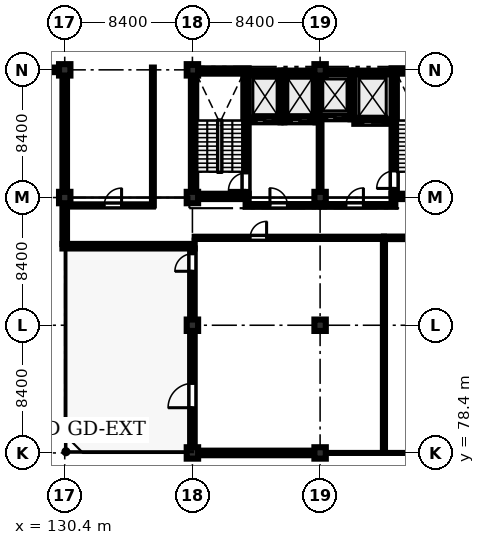
"""IFC4 building model, lengths in metres.
Left out: names, types, materials, properties, quantities, classifications, styles, units other than length and angle.
Written with IfcOpenShell. Run it as: python <this file> out.ifc"""

import sys

from ifc_helpers import new_model, si_unit, direction, frame, frame_2d, origin, origin_2d, place, context, subcontext, project, spatial, rectangle, extrude, element, fill, save


model = new_model("IFC4")
c1 = context("Model", 3, precision=1e-05, world=origin(), true_north=direction((0.0, 1.0)))
c2 = subcontext(c1, "Body", "Model", "MODEL_VIEW")
j1 = project(units=[si_unit("LENGTHUNIT", "METRE"), si_unit("PLANEANGLEUNIT", "RADIAN")], contexts=[c1])
p1 = place(None, origin())
s1 = spatial("IfcSite", under=j1, at=p1, CompositionType="ELEMENT")
p2 = place(p1, origin())
s2 = spatial("IfcBuilding", under=s1, at=p2, CompositionType="ELEMENT")
p3 = place(p2, frame((0.0, 0.0, 44.4)))
s3 = spatial("IfcBuildingStorey", under=s2, at=p3, CompositionType="ELEMENT", Elevation=44.4)
for number, where, z_axis, x_axis in (
    (1, (130.4, 95.2, 0.0), (0.0, 0.0, 1.0), (1.0, 0.0, 0.0)),
    (2, (130.4, 103.6, 0.0), (0.0, 0.0, 1.0), (1.0, 0.0, 0.0)),
    (3, (138.8, 78.4, 0.0), (0.0, 0.0, 1.0), (1.0, 0.0, 0.0)),
    (4, (138.8, 86.8, 0.0), (0.0, 0.0, 1.0), (1.0, 0.0, 0.0)),
    (5, (138.8, 95.2, 0.0), (0.0, 0.0, 1.0), (1.0, 0.0, 0.0)),
    (6, (138.8, 103.6, 0.0), (0.0, 0.0, 1.0), (1.0, 0.0, 0.0)),
    (7, (147.2, 78.4, 0.0), (0.0, 0.0, 1.0), (1.0, 0.0, 0.0)),
    (8, (147.2, 86.8, 0.0), (0.0, 0.0, 1.0), (1.0, 0.0, 0.0)),
    (9, (147.2, 95.2, 0.0), (0.0, 0.0, 1.0), (1.0, 0.0, 0.0)),
    (10, (147.2, 103.6, 0.0), (0.0, 0.0, 1.0), (1.0, 0.0, 0.0)),
):
    element("IfcColumn", number, at=place(p3, frame(where, z_axis=z_axis, x_axis=x_axis)), inside=s3, PredefinedType="COLUMN", context=c2, shape_type="SweptSolid", body=[
        extrude(rectangle(XDim=0.75, YDim=0.75, at=origin_2d()), origin(), (0.0, 0.0, 1.0), 4.01),
    ])
for number, where, z_axis, x_axis in (
    (11, (138.7, 95.275, 0.0), (0.0, 0.0, 1.0), (1.0, 0.0, 0.0)),
    (12, (138.7, 103.525, 0.0), (0.0, 0.0, 1.0), (1.0, 0.0, 0.0)),
):
    element("IfcWall", number, at=place(p3, frame(where, z_axis=z_axis, x_axis=x_axis)), inside=s3, PredefinedType="SHEAR", context=c2, shape_type="SweptSolid", body=[
        extrude(rectangle(XDim=3.8, YDim=0.35, at=frame_2d((1.9, 0.0))), origin(), (0.0, 0.0, 1.0), 4.01),
    ])
p4 = place(p3, frame((138.875, 95.45, 0.0), z_axis=(0.0, 0.0, 1.0), x_axis=(0.0, 1.0, 0.0)))
e13 = element("IfcWall", 13, at=p4, inside=s3, PredefinedType="SHEAR", context=c2, shape_type="SweptSolid", body=[
    extrude(rectangle(XDim=7.9, YDim=0.35, at=frame_2d((3.95, 0.0))), origin(), (0.0, 0.0, 1.0), 4.01),
])
p5 = place(p3, frame((142.325, 95.45, 0.0), z_axis=(0.0, 0.0, 1.0), x_axis=(0.0, 1.0, 0.0)))
e14 = element("IfcWall", 14, at=p5, inside=s3, PredefinedType="SHEAR", context=c2, shape_type="SweptSolid", body=[
    extrude(rectangle(XDim=7.9, YDim=0.35, at=frame_2d((3.95, 0.0))), origin(), (0.0, 0.0, 1.0), 4.01),
])
p6 = place(p5, frame((0.22, 0.0, 0.0)))
e15 = element("IfcOpeningElement", 15, at=p6, cuts=e14, PredefinedType="OPENING", context=c2, shape_type="SweptSolid", body=[
    extrude(rectangle(XDim=1.15, YDim=2.15, at=frame_2d((0.575, 1.075))), frame((0.0, 0.185, 0.0), z_axis=(0.0, -1.0, 0.0), x_axis=(1.0, 0.0, 0.0)), (0.0, 0.0, 1.0), 0.37),
])
for number, where, z_axis, x_axis in (
    (16, (151.9, 95.275, 0.0), (0.0, 0.0, 1.0), (1.0, 0.0, 0.0)),
    (17, (151.9, 103.525, 0.0), (0.0, 0.0, 1.0), (1.0, 0.0, 0.0)),
):
    element("IfcWall", number, at=place(p3, frame(where, z_axis=z_axis, x_axis=x_axis)), inside=s3, PredefinedType="SHEAR", context=c2, shape_type="SweptSolid", body=[
        extrude(rectangle(XDim=3.8, YDim=0.35, at=frame_2d((1.9, 0.0))), origin(), (0.0, 0.0, 1.0), 4.01),
    ])
p7 = place(p3, frame((152.075, 95.45, 0.0), z_axis=(0.0, 0.0, 1.0), x_axis=(0.0, 1.0, 0.0)))
e18 = element("IfcWall", 18, at=p7, inside=s3, PredefinedType="SHEAR", context=c2, shape_type="SweptSolid", body=[
    extrude(rectangle(XDim=7.9, YDim=0.35, at=frame_2d((3.95, 0.0))), origin(), (0.0, 0.0, 1.0), 4.01),
])
p8 = place(p7, frame((0.35, 0.0, 0.0)))
e19 = element("IfcOpeningElement", 19, at=p8, cuts=e18, PredefinedType="OPENING", context=c2, shape_type="SweptSolid", body=[
    extrude(rectangle(XDim=1.15, YDim=2.15, at=frame_2d((0.575, 1.075))), frame((0.0, 0.185, 0.0), z_axis=(0.0, -1.0, 0.0), x_axis=(1.0, 0.0, 0.0)), (0.0, 0.0, 1.0), 0.37),
])
p9 = place(p3, frame((142.5, 100.275, 0.0), z_axis=(0.0, 0.0, 1.0), x_axis=(1.0, 0.0, 0.0)))
e20 = element("IfcWall", 20, at=p9, inside=s3, PredefinedType="SHEAR", context=c2, shape_type="SweptSolid", body=[
    extrude(rectangle(XDim=2.1, YDim=0.25, at=frame_2d((1.05, 0.0))), origin(), (0.0, 0.0, 1.0), 4.01),
])
p10 = place(p9, frame((0.5, 0.0, 0.0)))
e21 = element("IfcOpeningElement", 21, at=p10, cuts=e20, PredefinedType="OPENING", context=c2, shape_type="SweptSolid", body=[
    extrude(rectangle(XDim=1.1, YDim=2.15, at=frame_2d((0.55, 1.075))), frame((0.0, 0.135, 0.0), z_axis=(0.0, -1.0, 0.0), x_axis=(1.0, 0.0, 0.0)), (0.0, 0.0, 1.0), 0.27),
])
p11 = place(p3, frame((142.5, 103.425, 0.0), z_axis=(0.0, 0.0, 1.0), x_axis=(1.0, 0.0, 0.0)))
e22 = element("IfcWall", 22, at=p11, inside=s3, PredefinedType="SHEAR", context=c2, shape_type="SweptSolid", body=[
    extrude(rectangle(XDim=2.1, YDim=0.25, at=frame_2d((1.05, 0.0))), origin(), (0.0, 0.0, 1.0), 4.01),
])
p12 = place(p3, frame((144.725, 100.15, 0.0), z_axis=(0.0, 0.0, 1.0), x_axis=(0.0, 1.0, 0.0)))
e23 = element("IfcWall", 23, at=p12, inside=s3, PredefinedType="SHEAR", context=c2, shape_type="SweptSolid", body=[
    extrude(rectangle(XDim=3.4, YDim=0.25, at=frame_2d((1.7, 0.0))), origin(), (0.0, 0.0, 1.0), 4.01),
])
p13 = place(p3, frame((144.85, 100.275, 0.0), z_axis=(0.0, 0.0, 1.0), x_axis=(1.0, 0.0, 0.0)))
e24 = element("IfcWall", 24, at=p13, inside=s3, PredefinedType="SHEAR", context=c2, shape_type="SweptSolid", body=[
    extrude(rectangle(XDim=2.05, YDim=0.25, at=frame_2d((1.025, 0.0))), origin(), (0.0, 0.0, 1.0), 4.01),
])
p14 = place(p13, frame((0.465, 0.0, 0.0)))
e25 = element("IfcOpeningElement", 25, at=p14, cuts=e24, PredefinedType="OPENING", context=c2, shape_type="SweptSolid", body=[
    extrude(rectangle(XDim=1.12, YDim=2.15, at=frame_2d((0.56, 1.075))), frame((0.0, 0.135, 0.0), z_axis=(0.0, -1.0, 0.0), x_axis=(1.0, 0.0, 0.0)), (0.0, 0.0, 1.0), 0.27),
])
p15 = place(p3, frame((144.85, 103.425, 0.0), z_axis=(0.0, 0.0, 1.0), x_axis=(1.0, 0.0, 0.0)))
e26 = element("IfcWall", 26, at=p15, inside=s3, PredefinedType="SHEAR", context=c2, shape_type="SweptSolid", body=[
    extrude(rectangle(XDim=2.05, YDim=0.25, at=frame_2d((1.025, 0.0))), origin(), (0.0, 0.0, 1.0), 4.01),
])
p16 = place(p3, frame((147.025, 100.15, 0.0), z_axis=(0.0, 0.0, 1.0), x_axis=(0.0, 1.0, 0.0)))
e27 = element("IfcWall", 27, at=p16, inside=s3, PredefinedType="SHEAR", context=c2, shape_type="SweptSolid", body=[
    extrude(rectangle(XDim=3.4, YDim=0.25, at=frame_2d((1.7, 0.0))), origin(), (0.0, 0.0, 1.0), 4.01),
])
p17 = place(p3, frame((147.15, 100.475, 0.0), z_axis=(0.0, 0.0, 1.0), x_axis=(1.0, 0.0, 0.0)))
e28 = element("IfcWall", 28, at=p17, inside=s3, PredefinedType="SHEAR", context=c2, shape_type="SweptSolid", body=[
    extrude(rectangle(XDim=2.05, YDim=0.25, at=frame_2d((1.025, 0.0))), origin(), (0.0, 0.0, 1.0), 4.01),
])
p18 = place(p17, frame((0.495, 0.0, 0.0)))
e29 = element("IfcOpeningElement", 29, at=p18, cuts=e28, PredefinedType="OPENING", context=c2, shape_type="SweptSolid", body=[
    extrude(rectangle(XDim=1.06, YDim=2.15, at=frame_2d((0.53, 1.075))), frame((0.0, 0.135, 0.0), z_axis=(0.0, -1.0, 0.0), x_axis=(1.0, 0.0, 0.0)), (0.0, 0.0, 1.0), 0.27),
])
p19 = place(p3, frame((147.15, 103.425, 0.0), z_axis=(0.0, 0.0, 1.0), x_axis=(1.0, 0.0, 0.0)))
e30 = element("IfcWall", 30, at=p19, inside=s3, PredefinedType="SHEAR", context=c2, shape_type="SweptSolid", body=[
    extrude(rectangle(XDim=2.05, YDim=0.25, at=frame_2d((1.025, 0.0))), origin(), (0.0, 0.0, 1.0), 4.01),
])
p20 = place(p3, frame((149.325, 100.35, 0.0), z_axis=(0.0, 0.0, 1.0), x_axis=(0.0, 1.0, 0.0)))
e31 = element("IfcWall", 31, at=p20, inside=s3, PredefinedType="SHEAR", context=c2, shape_type="SweptSolid", body=[
    extrude(rectangle(XDim=3.2, YDim=0.25, at=frame_2d((1.6, 0.0))), origin(), (0.0, 0.0, 1.0), 4.01),
])
p21 = place(p3, frame((149.45, 100.175, 0.0), z_axis=(0.0, 0.0, 1.0), x_axis=(1.0, 0.0, 0.0)))
e32 = element("IfcWall", 32, at=p21, inside=s3, PredefinedType="SHEAR", context=c2, shape_type="SweptSolid", body=[
    extrude(rectangle(XDim=2.45, YDim=0.25, at=frame_2d((1.225, 0.0))), origin(), (0.0, 0.0, 1.0), 4.01),
])
p22 = place(p21, frame((0.575, 0.0, 0.0)))
e33 = element("IfcOpeningElement", 33, at=p22, cuts=e32, PredefinedType="OPENING", context=c2, shape_type="SweptSolid", body=[
    extrude(rectangle(XDim=1.3, YDim=2.25, at=frame_2d((0.65, 1.125))), frame((0.0, 0.135, 0.0), z_axis=(0.0, -1.0, 0.0), x_axis=(1.0, 0.0, 0.0)), (0.0, 0.0, 1.0), 0.27),
])
p23 = place(p3, frame((149.45, 103.425, 0.0), z_axis=(0.0, 0.0, 1.0), x_axis=(1.0, 0.0, 0.0)))
e34 = element("IfcWall", 34, at=p23, inside=s3, PredefinedType="SHEAR", context=c2, shape_type="SweptSolid", body=[
    extrude(rectangle(XDim=2.45, YDim=0.25, at=frame_2d((1.225, 0.0))), origin(), (0.0, 0.0, 1.0), 4.01),
])
p24 = place(p3, frame((146.825, 78.4, 0.0), z_axis=(0.0, 0.0, 1.0), x_axis=(-1.0, 0.0, 0.0)))
e35 = element("IfcWall", 35, at=p24, inside=s3, PredefinedType="STANDARD", context=c2, shape_type="SweptSolid", body=[
    extrude(rectangle(XDim=7.65, YDim=0.3, at=frame_2d((3.825, 0.0))), origin(), (0.0, 0.0, 1.0), 3.31),
])
p25 = place(p24, frame((1.15, 0.0, 0.95)))
e36 = element("IfcOpeningElement", 36, at=p25, cuts=e35, PredefinedType="OPENING", context=c2, shape_type="SweptSolid", body=[
    extrude(rectangle(XDim=2.35, YDim=1.95, at=frame_2d((1.175, 0.975))), frame((0.0, 0.16, 0.0), z_axis=(0.0, -1.0, 0.0), x_axis=(1.0, 0.0, 0.0)), (0.0, 0.0, 1.0), 0.32),
])
p26 = place(p3, frame((130.4, 92.15, 0.0), z_axis=(0.0, 0.0, 1.0), x_axis=(0.0, 1.0, 0.0)))
e37 = element("IfcWall", 37, at=p26, inside=s3, PredefinedType="STANDARD", context=c2, shape_type="SweptSolid", body=[
    extrude(rectangle(XDim=2.675, YDim=0.3, at=frame_2d((1.337, 0.0))), origin(), (0.0, 0.0, 1.0), 4.01),
])
p27 = place(p3, frame((138.8, 78.775, 0.0), z_axis=(0.0, 0.0, 1.0), x_axis=(0.0, 1.0, 0.0)))
e38 = element("IfcWall", 38, at=p27, inside=s3, PredefinedType="STANDARD", context=c2, shape_type="SweptSolid", body=[
    extrude(rectangle(XDim=7.65, YDim=0.3, at=frame_2d((3.825, 0.0))), origin(), (0.0, 0.0, 1.0), 3.31),
])
p28 = place(p27, frame((2.6, 0.0, 0.0)))
e39 = element("IfcOpeningElement", 39, at=p28, cuts=e38, PredefinedType="OPENING", context=c2, shape_type="SweptSolid", body=[
    extrude(rectangle(XDim=1.6, YDim=2.25, at=frame_2d((0.8, 1.125))), frame((0.0, 0.16, 0.0), z_axis=(0.0, -1.0, 0.0), x_axis=(1.0, 0.0, 0.0)), (0.0, 0.0, 1.0), 0.32),
])
p29 = place(p3, frame((138.8, 87.175, 0.0), z_axis=(0.0, 0.0, 1.0), x_axis=(0.0, 1.0, 0.0)))
e40 = element("IfcWall", 40, at=p29, inside=s3, PredefinedType="STANDARD", context=c2, shape_type="SweptSolid", body=[
    extrude(rectangle(XDim=4.675, YDim=0.3, at=frame_2d((2.337, 0.0))), origin(), (0.0, 0.0, 1.0), 3.31),
])
p30 = place(p29, frame((3.175, 0.0, 0.0)))
e41 = element("IfcOpeningElement", 41, at=p30, cuts=e40, PredefinedType="OPENING", context=c2, shape_type="SweptSolid", body=[
    extrude(rectangle(XDim=1.15, YDim=2.25, at=frame_2d((0.575, 1.125))), frame((0.0, 0.16, 0.0), z_axis=(0.0, -1.0, 0.0), x_axis=(1.0, 0.0, 0.0)), (0.0, 0.0, 1.0), 0.32),
])
p31 = place(p3, frame((130.4, 95.575, 0.0), z_axis=(0.0, 0.0, 1.0), x_axis=(0.0, 1.0, 0.0)))
e42 = element("IfcWall", 42, at=p31, inside=s3, PredefinedType="STANDARD", context=c2, shape_type="SweptSolid", body=[
    extrude(rectangle(XDim=7.65, YDim=0.3, at=frame_2d((3.825, 0.0))), origin(), (0.0, 0.0, 1.0), 3.31),
])
p32 = place(p31, frame((2.4, 0.0, 1.0)))
e43 = element("IfcOpeningElement", 43, at=p32, cuts=e42, PredefinedType="OPENING", context=c2, shape_type="SweptSolid", body=[
    extrude(rectangle(XDim=1.8, YDim=1.8, at=frame_2d((0.9, 0.9))), frame((0.0, 0.16, 0.0), z_axis=(0.0, -1.0, 0.0), x_axis=(1.0, 0.0, 0.0)), (0.0, 0.0, 1.0), 0.32),
])
p33 = place(p3, frame((130.025, 103.6, 0.0), z_axis=(0.0, 0.0, 1.0), x_axis=(-1.0, 0.0, 0.0)))
e44 = element("IfcWall", 44, at=p33, inside=s3, PredefinedType="STANDARD", context=c2, shape_type="SweptSolid", body=[
    extrude(rectangle(XDim=7.65, YDim=0.3, at=frame_2d((3.825, 0.0))), origin(), (0.0, 0.0, 1.0), 3.31),
])
p34 = place(p3, frame((138.95, 92.0, 0.0), z_axis=(0.0, 0.0, 1.0), x_axis=(-1.0, 0.0, 0.0)))
e45 = element("IfcWall", 45, at=p34, inside=s3, PredefinedType="STANDARD", context=c2, shape_type="SweptSolid", body=[
    extrude(rectangle(XDim=8.7, YDim=0.3, at=frame_2d((4.35, 0.0))), origin(), (0.0, 0.0, 1.0), 4.01),
])
p35 = place(p3, frame((142.3, 94.68, 0.0), z_axis=(0.0, 0.0, 1.0), x_axis=(1.0, 0.0, 0.0)))
e46 = element("IfcWall", 46, at=p35, inside=s3, PredefinedType="STANDARD", context=c2, shape_type="SweptSolid", body=[
    extrude(rectangle(XDim=4.8, YDim=0.18, at=frame_2d((2.4, 0.0))), origin(), (0.0, 0.0, 1.0), 4.01),
])
p36 = place(p35, frame((1.6, 0.0, 0.0)))
e47 = element("IfcOpeningElement", 47, at=p36, cuts=e46, PredefinedType="OPENING", context=c2, shape_type="SweptSolid", body=[
    extrude(rectangle(XDim=1.15, YDim=2.15, at=frame_2d((0.575, 1.075))), frame((0.0, 0.1, 0.0), z_axis=(0.0, -1.0, 0.0), x_axis=(1.0, 0.0, 0.0)), (0.0, 0.0, 1.0), 0.2),
])
p37 = place(p3, frame((147.3, 94.68, 0.0), z_axis=(0.0, 0.0, 1.0), x_axis=(1.0, 0.0, 0.0)))
e48 = element("IfcWall", 48, at=p37, inside=s3, PredefinedType="STANDARD", context=c2, shape_type="SweptSolid", body=[
    extrude(rectangle(XDim=4.85, YDim=0.18, at=frame_2d((2.425, 0.0))), origin(), (0.0, 0.0, 1.0), 4.01),
])
p38 = place(p37, frame((1.6, 0.0, 0.0)))
e49 = element("IfcOpeningElement", 49, at=p38, cuts=e48, PredefinedType="OPENING", context=c2, shape_type="SweptSolid", body=[
    extrude(rectangle(XDim=1.15, YDim=2.15, at=frame_2d((0.575, 1.075))), frame((0.0, 0.1, 0.0), z_axis=(0.0, -1.0, 0.0), x_axis=(1.0, 0.0, 0.0)), (0.0, 0.0, 1.0), 0.2),
])
p39 = place(p3, frame((147.2, 95.75, 0.0), z_axis=(0.0, 0.0, 1.0), x_axis=(0.0, 1.0, 0.0)))
e50 = element("IfcWall", 50, at=p39, inside=s3, PredefinedType="STANDARD", context=c2, shape_type="SweptSolid", body=[
    extrude(rectangle(XDim=4.5, YDim=0.18, at=frame_2d((2.25, 0.0))), origin(), (0.0, 0.0, 1.0), 3.31),
])
p40 = place(p3, frame((136.2, 94.68, 0.0), z_axis=(0.0, 0.0, 1.0), x_axis=(0.0, 1.0, 0.0)))
e51 = element("IfcWall", 51, at=p40, inside=s3, PredefinedType="PARTITIONING", context=c2, shape_type="SweptSolid", body=[
    extrude(rectangle(XDim=9.07, YDim=0.12, at=frame_2d((4.535, 0.0))), origin(), (0.0, 0.0, 1.0), 4.01),
])
p41 = place(p3, frame((130.8, 94.68, 0.0), z_axis=(0.0, 0.0, 1.0), x_axis=(1.0, 0.0, 0.0)))
e52 = element("IfcWall", 52, at=p41, inside=s3, PredefinedType="PARTITIONING", context=c2, shape_type="SweptSolid", body=[
    extrude(rectangle(XDim=5.4, YDim=0.145, at=frame_2d((2.7, 0.0))), origin(), (0.0, 0.0, 1.0), 4.01),
])
p42 = place(p41, frame((2.2, 0.0, 0.0)))
e53 = element("IfcOpeningElement", 53, at=p42, cuts=e52, PredefinedType="OPENING", context=c2, shape_type="SweptSolid", body=[
    extrude(rectangle(XDim=1.14, YDim=2.18, at=frame_2d((0.57, 1.09))), frame((0.0, 0.083, 0.0), z_axis=(0.0, -1.0, 0.0), x_axis=(1.0, 0.0, 0.0)), (0.0, 0.0, 1.0), 0.165),
])
p43 = place(p3, frame((138.95, 92.55, 0.0), z_axis=(0.0, 0.0, 1.0), x_axis=(1.0, 0.0, 0.0)))
e54 = element("IfcWall", 54, at=p43, inside=s3, PredefinedType="PARTITIONING", context=c2, shape_type="SweptSolid", body=[
    extrude(rectangle(XDim=12.45, YDim=0.145, at=frame_2d((6.225, 0.0))), origin(), (0.0, 0.0, 1.0), 4.01),
])
p44 = place(p43, frame((3.65, 0.0, 0.0)))
e55 = element("IfcOpeningElement", 55, at=p44, cuts=e54, PredefinedType="OPENING", context=c2, shape_type="SweptSolid", body=[
    extrude(rectangle(XDim=1.08, YDim=2.15, at=frame_2d((0.54, 1.075))), frame((0.0, 0.083, 0.0), z_axis=(0.0, -1.0, 0.0), x_axis=(1.0, 0.0, 0.0)), (0.0, 0.0, 1.0), 0.165),
])
p45 = place(p3, frame((151.4, 92.55, 0.0), z_axis=(0.0, 0.0, 1.0), x_axis=(1.0, 0.0, 0.0)))
e56 = element("IfcWall", 56, at=p45, inside=s3, PredefinedType="PARTITIONING", context=c2, shape_type="SweptSolid", body=[
    extrude(rectangle(XDim=11.95, YDim=0.165, at=frame_2d((5.975, 0.0))), origin(), (0.0, 0.0, 1.0), 4.01),
])
p46 = place(p45, frame((6.8, 0.0, 0.0)))
e57 = element("IfcOpeningElement", 57, at=p46, cuts=e56, PredefinedType="OPENING", context=c2, shape_type="SweptSolid", body=[
    extrude(rectangle(XDim=1.14, YDim=2.18, at=frame_2d((0.57, 1.09))), frame((0.0, 0.093, 0.0), z_axis=(0.0, -1.0, 0.0), x_axis=(1.0, 0.0, 0.0)), (0.0, 0.0, 1.0), 0.185),
])
p47 = place(p3, frame((151.4, 78.55, 0.0), z_axis=(0.0, 0.0, 1.0), x_axis=(0.0, 1.0, 0.0)))
e58 = element("IfcWall", 58, at=p47, inside=s3, PredefinedType="PARTITIONING", context=c2, shape_type="SweptSolid", body=[
    extrude(rectangle(XDim=14.0, YDim=0.135, at=frame_2d((7.0, 0.0))), origin(), (0.0, 0.0, 1.0), 3.56),
])
p48 = place(p25, origin())
e59 = element("IfcWindow", 59, at=p48, inside=s3, PartitioningType="TRIPLE_PANEL_VERTICAL", PredefinedType="WINDOW", context=c2, shape_type="SweptSolid", body=[
    extrude(rectangle(XDim=2.35, YDim=1.95, at=frame_2d((1.175, 0.975))), frame((0.0, 0.03, 0.0), z_axis=(0.0, -1.0, 0.0), x_axis=(1.0, 0.0, 0.0)), (0.0, 0.0, 1.0), 0.06),
])
fill(e36, e59)
p49 = place(p28, origin())
e60 = element("IfcDoor", 60, at=p49, inside=s3, OperationType="SINGLE_SWING_LEFT", PredefinedType="DOOR", context=c2, shape_type="SweptSolid", body=[
    extrude(rectangle(XDim=1.6, YDim=2.25, at=frame_2d((0.8, 1.125))), frame((0.0, 0.025, 0.0), z_axis=(0.0, -1.0, 0.0), x_axis=(1.0, 0.0, 0.0)), (0.0, 0.0, 1.0), 0.05),
])
fill(e39, e60)
p50 = place(p30, origin())
e61 = element("IfcDoor", 61, at=p50, inside=s3, OperationType="SINGLE_SWING_LEFT", PredefinedType="DOOR", context=c2, shape_type="SweptSolid", body=[
    extrude(rectangle(XDim=1.15, YDim=2.25, at=frame_2d((0.575, 1.125))), frame((0.0, 0.025, 0.0), z_axis=(0.0, -1.0, 0.0), x_axis=(1.0, 0.0, 0.0)), (0.0, 0.0, 1.0), 0.05),
])
fill(e41, e61)
p51 = place(p32, origin())
e62 = element("IfcWindow", 62, at=p51, inside=s3, PartitioningType="DOUBLE_PANEL_VERTICAL", PredefinedType="WINDOW", context=c2, shape_type="SweptSolid", body=[
    extrude(rectangle(XDim=1.8, YDim=1.8, at=frame_2d((0.9, 0.9))), frame((0.0, 0.03, 0.0), z_axis=(0.0, -1.0, 0.0), x_axis=(1.0, 0.0, 0.0)), (0.0, 0.0, 1.0), 0.06),
])
fill(e43, e62)
p52 = place(p36, origin())
e63 = element("IfcDoor", 63, at=p52, inside=s3, OperationType="SINGLE_SWING_LEFT", PredefinedType="DOOR", context=c2, shape_type="SweptSolid", body=[
    extrude(rectangle(XDim=1.15, YDim=2.15, at=frame_2d((0.575, 1.075))), frame((0.0, 0.025, 0.0), z_axis=(0.0, -1.0, 0.0), x_axis=(1.0, 0.0, 0.0)), (0.0, 0.0, 1.0), 0.05),
])
fill(e47, e63)
p53 = place(p38, origin())
e64 = element("IfcDoor", 64, at=p53, inside=s3, OperationType="SINGLE_SWING_RIGHT", PredefinedType="DOOR", context=c2, shape_type="SweptSolid", body=[
    extrude(rectangle(XDim=1.15, YDim=2.15, at=frame_2d((0.575, 1.075))), frame((0.0, 0.025, 0.0), z_axis=(0.0, -1.0, 0.0), x_axis=(1.0, 0.0, 0.0)), (0.0, 0.0, 1.0), 0.05),
])
fill(e49, e64)
p54 = place(p42, origin())
e65 = element("IfcDoor", 65, at=p54, inside=s3, OperationType="SINGLE_SWING_RIGHT", PredefinedType="DOOR", context=c2, shape_type="SweptSolid", body=[
    extrude(rectangle(XDim=1.14, YDim=2.18, at=frame_2d((0.57, 1.09))), frame((0.0, 0.025, 0.0), z_axis=(0.0, -1.0, 0.0), x_axis=(1.0, 0.0, 0.0)), (0.0, 0.0, 1.0), 0.05),
])
fill(e53, e65)
p55 = place(p44, origin())
e66 = element("IfcDoor", 66, at=p55, inside=s3, OperationType="SINGLE_SWING_RIGHT", PredefinedType="DOOR", context=c2, shape_type="SweptSolid", body=[
    extrude(rectangle(XDim=1.08, YDim=2.15, at=frame_2d((0.54, 1.075))), frame((0.0, 0.025, 0.0), z_axis=(0.0, -1.0, 0.0), x_axis=(1.0, 0.0, 0.0)), (0.0, 0.0, 1.0), 0.05),
])
fill(e55, e66)
p56 = place(p6, origin())
e67 = element("IfcDoor", 67, at=p56, inside=s3, OperationType="SINGLE_SWING_LEFT", PredefinedType="DOOR", context=c2, shape_type="SweptSolid", body=[
    extrude(rectangle(XDim=1.15, YDim=2.15, at=frame_2d((0.575, 1.075))), frame((0.0, 0.025, 0.0), z_axis=(0.0, -1.0, 0.0), x_axis=(1.0, 0.0, 0.0)), (0.0, 0.0, 1.0), 0.05),
])
fill(e15, e67)
p57 = place(p8, origin())
e68 = element("IfcDoor", 68, at=p57, inside=s3, OperationType="SINGLE_SWING_LEFT", PredefinedType="DOOR", context=c2, shape_type="SweptSolid", body=[
    extrude(rectangle(XDim=1.15, YDim=2.15, at=frame_2d((0.575, 1.075))), frame((0.0, 0.025, 0.0), z_axis=(0.0, -1.0, 0.0), x_axis=(1.0, 0.0, 0.0)), (0.0, 0.0, 1.0), 0.05),
])
fill(e19, e68)
p58 = place(p10, origin())
e69 = element("IfcDoor", 69, at=p58, inside=s3, OperationType="SLIDING_TO_LEFT", PredefinedType="DOOR", context=c2, shape_type="SweptSolid", body=[
    extrude(rectangle(XDim=1.1, YDim=2.15, at=frame_2d((0.55, 1.075))), frame((0.0, 0.025, 0.0), z_axis=(0.0, -1.0, 0.0), x_axis=(1.0, 0.0, 0.0)), (0.0, 0.0, 1.0), 0.05),
])
fill(e21, e69)
p59 = place(p14, origin())
e70 = element("IfcDoor", 70, at=p59, inside=s3, OperationType="SLIDING_TO_LEFT", PredefinedType="DOOR", context=c2, shape_type="SweptSolid", body=[
    extrude(rectangle(XDim=1.12, YDim=2.15, at=frame_2d((0.56, 1.075))), frame((0.0, 0.025, 0.0), z_axis=(0.0, -1.0, 0.0), x_axis=(1.0, 0.0, 0.0)), (0.0, 0.0, 1.0), 0.05),
])
fill(e25, e70)
p60 = place(p18, origin())
e71 = element("IfcDoor", 71, at=p60, inside=s3, OperationType="SLIDING_TO_LEFT", PredefinedType="DOOR", context=c2, shape_type="SweptSolid", body=[
    extrude(rectangle(XDim=1.06, YDim=2.15, at=frame_2d((0.53, 1.075))), frame((0.0, 0.025, 0.0), z_axis=(0.0, -1.0, 0.0), x_axis=(1.0, 0.0, 0.0)), (0.0, 0.0, 1.0), 0.05),
])
fill(e29, e71)
p61 = place(p22, origin())
e72 = element("IfcDoor", 72, at=p61, inside=s3, OperationType="SLIDING_TO_LEFT", PredefinedType="DOOR", context=c2, shape_type="SweptSolid", body=[
    extrude(rectangle(XDim=1.3, YDim=2.25, at=frame_2d((0.65, 1.125))), frame((0.0, 0.025, 0.0), z_axis=(0.0, -1.0, 0.0), x_axis=(1.0, 0.0, 0.0)), (0.0, 0.0, 1.0), 0.05),
])
fill(e33, e72)
save(model, sys.argv[1])
